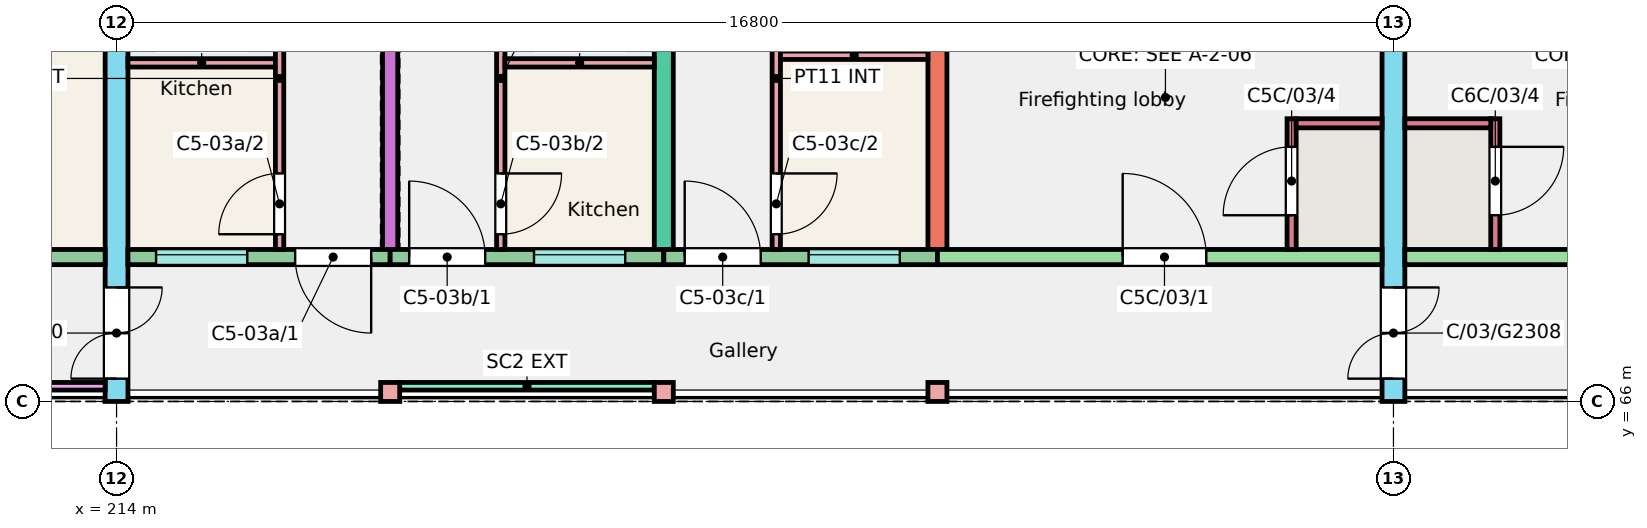
"""IFC4 building model, lengths in metres.
Left out: names, types, materials, properties, quantities, classifications, styles, units other than length and angle.
Written with IfcOpenShell. Run it as: python <this file> out.ifc"""

import sys

from ifc_helpers import new_model, si_unit, direction, frame, frame_2d, origin, origin_2d, place, context, subcontext, project, spatial, rectangle, extrude, element, fill, save


model = new_model("IFC4")
c1 = context("Model", 3, precision=1e-05, world=origin(), true_north=direction((0.0, 1.0)))
c2 = subcontext(c1, "Body", "Model", "MODEL_VIEW")
j1 = project(units=[si_unit("LENGTHUNIT", "METRE"), si_unit("PLANEANGLEUNIT", "RADIAN")], contexts=[c1])
p1 = place(None, origin())
s1 = spatial("IfcSite", under=j1, at=p1, CompositionType="ELEMENT")
p2 = place(p1, origin())
s2 = spatial("IfcBuilding", under=s1, at=p2, CompositionType="ELEMENT")
p3 = place(p2, frame((0.0, 0.0, 9.0)))
s3 = spatial("IfcBuildingStorey", under=s2, at=p3, CompositionType="ELEMENT", Elevation=9.0)
p4 = place(p3, frame((214.0, 66.0, 0.0), z_axis=(0.0, 0.0, 1.0), x_axis=(0.0, 1.0, 0.0)))
e1 = element("IfcWall", 1, at=p4, inside=s3, PredefinedType="SHEAR", context=c2, shape_type="SweptSolid", body=[
    extrude(rectangle(XDim=11.0, YDim=0.3, at=frame_2d((5.5, 0.0))), origin(), (0.0, 0.0, 1.0), 3.0),
])
p5 = place(p4, frame((0.3, 0.0, 0.0)))
e2 = element("IfcOpeningElement", 2, at=p5, cuts=e1, PredefinedType="OPENING", context=c2, shape_type="SweptSolid", body=[
    extrude(rectangle(XDim=1.2, YDim=2.1, at=frame_2d((0.6, 1.05))), frame((0.0, 0.16, 0.0), z_axis=(0.0, -1.0, 0.0), x_axis=(1.0, 0.0, 0.0)), (0.0, 0.0, 1.0), 0.32),
])
p6 = place(p3, frame((217.6, 68.0, 0.0), z_axis=(0.0, 0.0, 1.0), x_axis=(0.0, 1.0, 0.0)))
e3 = element("IfcWall", 3, at=p6, inside=s3, PredefinedType="SHEAR", context=c2, shape_type="SweptSolid", body=[
    extrude(rectangle(XDim=9.0, YDim=0.2, at=frame_2d((4.5, 0.0))), origin(), (0.0, 0.0, 1.0), 3.0),
])
for number, where, z_axis, x_axis in (
    (4, (221.2, 68.0, 0.0), (0.0, 0.0, 1.0), (0.0, 1.0, 0.0)),
    (5, (224.8, 68.0, 0.0), (0.0, 0.0, 1.0), (0.0, 1.0, 0.0)),
):
    element("IfcWall", number, at=place(p3, frame(where, z_axis=z_axis, x_axis=x_axis)), inside=s3, PredefinedType="SHEAR", context=c2, shape_type="SweptSolid", body=[
        extrude(rectangle(XDim=9.0, YDim=0.25, at=frame_2d((4.5, 0.0))), origin(), (0.0, 0.0, 1.0), 3.0),
    ])
p7 = place(p3, frame((230.8, 66.0, 0.0), z_axis=(0.0, 0.0, 1.0), x_axis=(0.0, 1.0, 0.0)))
e6 = element("IfcWall", 6, at=p7, inside=s3, PredefinedType="SHEAR", context=c2, shape_type="SweptSolid", body=[
    extrude(rectangle(XDim=11.0, YDim=0.3, at=frame_2d((5.5, 0.0))), origin(), (0.0, 0.0, 1.0), 3.0),
])
p8 = place(p7, frame((0.3, 0.0, 0.0)))
e7 = element("IfcOpeningElement", 7, at=p8, cuts=e6, PredefinedType="OPENING", context=c2, shape_type="SweptSolid", body=[
    extrude(rectangle(XDim=1.2, YDim=2.1, at=frame_2d((0.6, 1.05))), frame((0.0, 0.16, 0.0), z_axis=(0.0, -1.0, 0.0), x_axis=(1.0, 0.0, 0.0)), (0.0, 0.0, 1.0), 0.32),
])
p9 = place(p3, frame((210.4, 67.9, 0.0), z_axis=(0.0, 0.0, 1.0), x_axis=(1.0, 0.0, 0.0)))
e8 = element("IfcWall", 8, at=p9, inside=s3, PredefinedType="SOLIDWALL", context=c2, shape_type="SweptSolid", body=[
    extrude(rectangle(XDim=3.45, YDim=0.2, at=frame_2d((1.725, 0.0))), origin(), (0.0, 0.0, 1.0), 3.0),
])
p10 = place(p9, frame((1.025, 0.0, 0.9)))
e9 = element("IfcOpeningElement", 9, at=p10, cuts=e8, PredefinedType="OPENING", context=c2, shape_type="SweptSolid", body=[
    extrude(rectangle(XDim=1.5, YDim=1.5, at=frame_2d((0.75, 0.75))), frame((0.0, 0.11, 0.0), z_axis=(0.0, -1.0, 0.0), x_axis=(1.0, 0.0, 0.0)), (0.0, 0.0, 1.0), 0.22),
])
p11 = place(p3, frame((214.15, 67.9, 0.0), z_axis=(0.0, 0.0, 1.0), x_axis=(1.0, 0.0, 0.0)))
e10 = element("IfcWall", 10, at=p11, inside=s3, PredefinedType="SOLIDWALL", context=c2, shape_type="SweptSolid", body=[
    extrude(rectangle(XDim=3.45, YDim=0.2, at=frame_2d((1.725, 0.0))), origin(), (0.0, 0.0, 1.0), 3.0),
])
p12 = place(p11, frame((0.37, 0.0, 1.1)))
e11 = element("IfcOpeningElement", 11, at=p12, cuts=e10, PredefinedType="OPENING", context=c2, shape_type="SweptSolid", body=[
    extrude(rectangle(XDim=1.2, YDim=1.3, at=frame_2d((0.6, 0.65))), frame((0.0, 0.11, 0.0), z_axis=(0.0, -1.0, 0.0), x_axis=(1.0, 0.0, 0.0)), (0.0, 0.0, 1.0), 0.22),
])
p13 = place(p11, frame((2.2, 0.0, 0.0)))
e12 = element("IfcOpeningElement", 12, at=p13, cuts=e10, PredefinedType="OPENING", context=c2, shape_type="SweptSolid", body=[
    extrude(rectangle(XDim=1.0, YDim=2.1, at=frame_2d((0.5, 1.05))), frame((0.0, 0.11, 0.0), z_axis=(0.0, -1.0, 0.0), x_axis=(1.0, 0.0, 0.0)), (0.0, 0.0, 1.0), 0.22),
])
p14 = place(p3, frame((217.6, 67.9, 0.0), z_axis=(0.0, 0.0, 1.0), x_axis=(1.0, 0.0, 0.0)))
e13 = element("IfcWall", 13, at=p14, inside=s3, PredefinedType="SOLIDWALL", context=c2, shape_type="SweptSolid", body=[
    extrude(rectangle(XDim=3.6, YDim=0.2, at=frame_2d((1.8, 0.0))), origin(), (0.0, 0.0, 1.0), 3.0),
])
p15 = place(p14, frame((1.893, 0.0, 1.1)))
e14 = element("IfcOpeningElement", 14, at=p15, cuts=e13, PredefinedType="OPENING", context=c2, shape_type="SweptSolid", body=[
    extrude(rectangle(XDim=1.2, YDim=1.3, at=frame_2d((0.6, 0.65))), frame((0.0, 0.11, 0.0), z_axis=(0.0, -1.0, 0.0), x_axis=(1.0, 0.0, 0.0)), (0.0, 0.0, 1.0), 0.22),
])
p16 = place(p14, frame((0.25, 0.0, 0.0)))
e15 = element("IfcOpeningElement", 15, at=p16, cuts=e13, PredefinedType="OPENING", context=c2, shape_type="SweptSolid", body=[
    extrude(rectangle(XDim=1.0, YDim=2.1, at=frame_2d((0.5, 1.05))), frame((0.0, 0.11, 0.0), z_axis=(0.0, -1.0, 0.0), x_axis=(1.0, 0.0, 0.0)), (0.0, 0.0, 1.0), 0.22),
])
p17 = place(p3, frame((221.2, 67.9, 0.0), z_axis=(0.0, 0.0, 1.0), x_axis=(1.0, 0.0, 0.0)))
e16 = element("IfcWall", 16, at=p17, inside=s3, PredefinedType="SOLIDWALL", context=c2, shape_type="SweptSolid", body=[
    extrude(rectangle(XDim=3.6, YDim=0.2, at=frame_2d((1.8, 0.0))), origin(), (0.0, 0.0, 1.0), 3.0),
])
p18 = place(p17, frame((1.905, 0.0, 1.1)))
e17 = element("IfcOpeningElement", 17, at=p18, cuts=e16, PredefinedType="OPENING", context=c2, shape_type="SweptSolid", body=[
    extrude(rectangle(XDim=1.2, YDim=1.3, at=frame_2d((0.6, 0.65))), frame((0.0, 0.11, 0.0), z_axis=(0.0, -1.0, 0.0), x_axis=(1.0, 0.0, 0.0)), (0.0, 0.0, 1.0), 0.22),
])
p19 = place(p17, frame((0.275, 0.0, 0.0)))
e18 = element("IfcOpeningElement", 18, at=p19, cuts=e16, PredefinedType="OPENING", context=c2, shape_type="SweptSolid", body=[
    extrude(rectangle(XDim=1.0, YDim=2.1, at=frame_2d((0.5, 1.05))), frame((0.0, 0.11, 0.0), z_axis=(0.0, -1.0, 0.0), x_axis=(1.0, 0.0, 0.0)), (0.0, 0.0, 1.0), 0.22),
])
p20 = place(p3, frame((224.8, 67.9, 0.0), z_axis=(0.0, 0.0, 1.0), x_axis=(1.0, 0.0, 0.0)))
e19 = element("IfcWall", 19, at=p20, inside=s3, PredefinedType="SHEAR", context=c2, shape_type="SweptSolid", body=[
    extrude(rectangle(XDim=5.85, YDim=0.2, at=frame_2d((2.925, 0.0))), origin(), (0.0, 0.0, 1.0), 3.0),
])
p21 = place(p20, frame((2.438, 0.0, 0.0)))
e20 = element("IfcOpeningElement", 20, at=p21, cuts=e19, PredefinedType="OPENING", context=c2, shape_type="SweptSolid", body=[
    extrude(rectangle(XDim=1.1, YDim=2.1, at=frame_2d((0.55, 1.05))), frame((0.0, 0.11, 0.0), z_axis=(0.0, -1.0, 0.0), x_axis=(1.0, 0.0, 0.0)), (0.0, 0.0, 1.0), 0.22),
])
p22 = place(p3, frame((229.46, 68.0, 0.0), z_axis=(0.0, 0.0, 1.0), x_axis=(0.0, 1.0, 0.0)))
e21 = element("IfcWall", 21, at=p22, inside=s3, PredefinedType="SHEAR", context=c2, shape_type="SweptSolid", body=[
    extrude(rectangle(XDim=1.72, YDim=0.12, at=frame_2d((0.86, 0.0))), origin(), (0.0, 0.0, 1.0), 3.0),
])
p23 = place(p22, frame((0.45, 0.0, 0.0)))
e22 = element("IfcOpeningElement", 22, at=p23, cuts=e21, PredefinedType="OPENING", context=c2, shape_type="SweptSolid", body=[
    extrude(rectangle(XDim=0.9, YDim=2.1, at=frame_2d((0.45, 1.05))), frame((0.0, 0.07, 0.0), z_axis=(0.0, -1.0, 0.0), x_axis=(1.0, 0.0, 0.0)), (0.0, 0.0, 1.0), 0.14),
])
p24 = place(p3, frame((229.52, 69.66, 0.0), z_axis=(0.0, 0.0, 1.0), x_axis=(1.0, 0.0, 0.0)))
e23 = element("IfcWall", 23, at=p24, inside=s3, PredefinedType="SHEAR", context=c2, shape_type="SweptSolid", body=[
    extrude(rectangle(XDim=1.13, YDim=0.12, at=frame_2d((0.565, 0.0))), origin(), (0.0, 0.0, 1.0), 3.0),
])
p25 = place(p3, frame((230.95, 67.9, 0.0), z_axis=(0.0, 0.0, 1.0), x_axis=(1.0, 0.0, 0.0)))
e24 = element("IfcWall", 24, at=p25, inside=s3, PredefinedType="SHEAR", context=c2, shape_type="SweptSolid", body=[
    extrude(rectangle(XDim=5.85, YDim=0.2, at=frame_2d((2.925, 0.0))), origin(), (0.0, 0.0, 1.0), 3.0),
])
p26 = place(p25, frame((2.312, 0.0, 0.0)))
e25 = element("IfcOpeningElement", 25, at=p26, cuts=e24, PredefinedType="OPENING", context=c2, shape_type="SweptSolid", body=[
    extrude(rectangle(XDim=1.1, YDim=2.1, at=frame_2d((0.55, 1.05))), frame((0.0, 0.11, 0.0), z_axis=(0.0, -1.0, 0.0), x_axis=(1.0, 0.0, 0.0)), (0.0, 0.0, 1.0), 0.22),
])
p27 = place(p3, frame((232.14, 68.0, 0.0), z_axis=(0.0, 0.0, 1.0), x_axis=(0.0, 1.0, 0.0)))
e26 = element("IfcWall", 26, at=p27, inside=s3, PredefinedType="SHEAR", context=c2, shape_type="SweptSolid", body=[
    extrude(rectangle(XDim=1.72, YDim=0.12, at=frame_2d((0.86, 0.0))), origin(), (0.0, 0.0, 1.0), 3.0),
])
p28 = place(p27, frame((0.45, 0.0, 0.0)))
e27 = element("IfcOpeningElement", 27, at=p28, cuts=e26, PredefinedType="OPENING", context=c2, shape_type="SweptSolid", body=[
    extrude(rectangle(XDim=0.9, YDim=2.1, at=frame_2d((0.45, 1.05))), frame((0.0, 0.07, 0.0), z_axis=(0.0, -1.0, 0.0), x_axis=(1.0, 0.0, 0.0)), (0.0, 0.0, 1.0), 0.14),
])
p29 = place(p3, frame((230.95, 69.66, 0.0), z_axis=(0.0, 0.0, 1.0), x_axis=(1.0, 0.0, 0.0)))
e28 = element("IfcWall", 28, at=p29, inside=s3, PredefinedType="SHEAR", context=c2, shape_type="SweptSolid", body=[
    extrude(rectangle(XDim=1.13, YDim=0.12, at=frame_2d((0.565, 0.0))), origin(), (0.0, 0.0, 1.0), 3.0),
])
for number, where, z_axis, x_axis in (
    (29, (217.6, 66.125, 0.0), (0.0, 0.0, 1.0), (1.0, 0.0, 0.0)),
    (30, (221.2, 66.125, 0.0), (0.0, 0.0, 1.0), (1.0, 0.0, 0.0)),
    (31, (224.8, 66.125, 0.0), (0.0, 0.0, 1.0), (1.0, 0.0, 0.0)),
):
    element("IfcColumn", number, at=place(p3, frame(where, z_axis=z_axis, x_axis=x_axis)), inside=s3, PredefinedType="COLUMN", context=c2, shape_type="SweptSolid", body=[
        extrude(rectangle(XDim=0.25, YDim=0.25, at=origin_2d()), origin(), (0.0, 0.0, 1.0), 3.0),
    ])
p30 = place(p3, frame((210.525, 66.2, 0.0), z_axis=(0.0, 0.0, 1.0), x_axis=(1.0, 0.0, 0.0)))
e32 = element("IfcWall", 32, at=p30, inside=s3, PredefinedType="SOLIDWALL", context=c2, shape_type="SweptSolid", body=[
    extrude(rectangle(XDim=3.325, YDim=0.1, at=frame_2d((1.663, 0.0))), origin(), (0.0, 0.0, 1.0), 2.45),
])
p31 = place(p3, frame((217.725, 66.2, 0.0), z_axis=(0.0, 0.0, 1.0), x_axis=(1.0, 0.0, 0.0)))
e33 = element("IfcWall", 33, at=p31, inside=s3, PredefinedType="SOLIDWALL", context=c2, shape_type="SweptSolid", body=[
    extrude(rectangle(XDim=3.35, YDim=0.1, at=frame_2d((1.675, 0.0))), origin(), (0.0, 0.0, 1.0), 2.45),
])
p32 = place(p3, frame((214.15, 70.455, 0.0), z_axis=(0.0, 0.0, 1.0), x_axis=(1.0, 0.0, 0.0)))
e34 = element("IfcWall", 34, at=p32, inside=s3, PredefinedType="PARTITIONING", context=c2, shape_type="SweptSolid", body=[
    extrude(rectangle(XDim=1.94, YDim=0.11, at=frame_2d((0.97, 0.0))), origin(), (0.0, 0.0, 1.0), 2.8),
])
p33 = place(p3, frame((216.145, 68.0, 0.0), z_axis=(0.0, 0.0, 1.0), x_axis=(0.0, 1.0, 0.0)))
e35 = element("IfcWall", 35, at=p33, inside=s3, PredefinedType="PARTITIONING", context=c2, shape_type="SweptSolid", body=[
    extrude(rectangle(XDim=4.5, YDim=0.11, at=frame_2d((2.25, 0.0))), origin(), (0.0, 0.0, 1.0), 2.8),
])
p34 = place(p33, frame((0.2, 0.0, 0.0)))
e36 = element("IfcOpeningElement", 36, at=p34, cuts=e35, PredefinedType="OPENING", context=c2, shape_type="SweptSolid", body=[
    extrude(rectangle(XDim=0.8, YDim=2.1, at=frame_2d((0.4, 1.05))), frame((0.0, 0.065, 0.0), z_axis=(0.0, -1.0, 0.0), x_axis=(1.0, 0.0, 0.0)), (0.0, 0.0, 1.0), 0.13),
])
p35 = place(p33, frame((3.55, 0.0, 0.0)))
e37 = element("IfcOpeningElement", 37, at=p35, cuts=e35, PredefinedType="OPENING", context=c2, shape_type="SweptSolid", body=[
    extrude(rectangle(XDim=0.8, YDim=2.1, at=frame_2d((0.4, 1.05))), frame((0.0, 0.065, 0.0), z_axis=(0.0, -1.0, 0.0), x_axis=(1.0, 0.0, 0.0)), (0.0, 0.0, 1.0), 0.13),
])
p36 = place(p3, frame((219.055, 68.0, 0.0), z_axis=(0.0, 0.0, 1.0), x_axis=(0.0, 1.0, 0.0)))
e38 = element("IfcWall", 38, at=p36, inside=s3, PredefinedType="PARTITIONING", context=c2, shape_type="SweptSolid", body=[
    extrude(rectangle(XDim=4.5, YDim=0.11, at=frame_2d((2.25, 0.0))), origin(), (0.0, 0.0, 1.0), 2.8),
])
p37 = place(p36, frame((0.2, 0.0, 0.0)))
e39 = element("IfcOpeningElement", 39, at=p37, cuts=e38, PredefinedType="OPENING", context=c2, shape_type="SweptSolid", body=[
    extrude(rectangle(XDim=0.8, YDim=2.1, at=frame_2d((0.4, 1.05))), frame((0.0, 0.065, 0.0), z_axis=(0.0, -1.0, 0.0), x_axis=(1.0, 0.0, 0.0)), (0.0, 0.0, 1.0), 0.13),
])
p38 = place(p36, frame((3.55, 0.0, 0.0)))
e40 = element("IfcOpeningElement", 40, at=p38, cuts=e38, PredefinedType="OPENING", context=c2, shape_type="SweptSolid", body=[
    extrude(rectangle(XDim=0.8, YDim=2.1, at=frame_2d((0.4, 1.05))), frame((0.0, 0.065, 0.0), z_axis=(0.0, -1.0, 0.0), x_axis=(1.0, 0.0, 0.0)), (0.0, 0.0, 1.0), 0.13),
])
p39 = place(p3, frame((219.11, 70.455, 0.0), z_axis=(0.0, 0.0, 1.0), x_axis=(1.0, 0.0, 0.0)))
e41 = element("IfcWall", 41, at=p39, inside=s3, PredefinedType="PARTITIONING", context=c2, shape_type="SweptSolid", body=[
    extrude(rectangle(XDim=1.965, YDim=0.11, at=frame_2d((0.982, 0.0))), origin(), (0.0, 0.0, 1.0), 2.8),
])
p40 = place(p3, frame((222.68, 68.0, 0.0), z_axis=(0.0, 0.0, 1.0), x_axis=(0.0, 1.0, 0.0)))
e42 = element("IfcWall", 42, at=p40, inside=s3, PredefinedType="PARTITIONING", context=c2, shape_type="SweptSolid", body=[
    extrude(rectangle(XDim=4.5, YDim=0.11, at=frame_2d((2.25, 0.0))), origin(), (0.0, 0.0, 1.0), 2.8),
])
p41 = place(p40, frame((0.2, 0.0, 0.0)))
e43 = element("IfcOpeningElement", 43, at=p41, cuts=e42, PredefinedType="OPENING", context=c2, shape_type="SweptSolid", body=[
    extrude(rectangle(XDim=0.8, YDim=2.1, at=frame_2d((0.4, 1.05))), frame((0.0, 0.065, 0.0), z_axis=(0.0, -1.0, 0.0), x_axis=(1.0, 0.0, 0.0)), (0.0, 0.0, 1.0), 0.13),
])
p42 = place(p40, frame((3.55, 0.0, 0.0)))
e44 = element("IfcOpeningElement", 44, at=p42, cuts=e42, PredefinedType="OPENING", context=c2, shape_type="SweptSolid", body=[
    extrude(rectangle(XDim=0.8, YDim=2.1, at=frame_2d((0.4, 1.05))), frame((0.0, 0.065, 0.0), z_axis=(0.0, -1.0, 0.0), x_axis=(1.0, 0.0, 0.0)), (0.0, 0.0, 1.0), 0.13),
])
p43 = place(p3, frame((222.735, 70.555, 0.0), z_axis=(0.0, 0.0, 1.0), x_axis=(1.0, 0.0, 0.0)))
e45 = element("IfcWall", 45, at=p43, inside=s3, PredefinedType="PARTITIONING", context=c2, shape_type="SweptSolid", body=[
    extrude(rectangle(XDim=1.94, YDim=0.11, at=frame_2d((0.97, 0.0))), origin(), (0.0, 0.0, 1.0), 2.8),
])
p44 = place(p12, origin())
e46 = element("IfcWindow", 46, at=p44, inside=s3, PartitioningType="SINGLE_PANEL", PredefinedType="WINDOW", context=c2, shape_type="SweptSolid", body=[
    extrude(rectangle(XDim=1.2, YDim=1.3, at=frame_2d((0.6, 0.65))), frame((0.0, 0.06, 0.0), z_axis=(0.0, -1.0, 0.0), x_axis=(1.0, 0.0, 0.0)), (0.0, 0.0, 1.0), 0.06),
])
fill(e11, e46)
p45 = place(p15, origin())
e47 = element("IfcWindow", 47, at=p45, inside=s3, PartitioningType="SINGLE_PANEL", PredefinedType="WINDOW", context=c2, shape_type="SweptSolid", body=[
    extrude(rectangle(XDim=1.2, YDim=1.3, at=frame_2d((0.6, 0.65))), frame((0.0, 0.06, 0.0), z_axis=(0.0, -1.0, 0.0), x_axis=(1.0, 0.0, 0.0)), (0.0, 0.0, 1.0), 0.06),
])
fill(e14, e47)
p46 = place(p18, origin())
e48 = element("IfcWindow", 48, at=p46, inside=s3, PartitioningType="SINGLE_PANEL", PredefinedType="WINDOW", context=c2, shape_type="SweptSolid", body=[
    extrude(rectangle(XDim=1.2, YDim=1.3, at=frame_2d((0.6, 0.65))), frame((0.0, 0.06, 0.0), z_axis=(0.0, -1.0, 0.0), x_axis=(1.0, 0.0, 0.0)), (0.0, 0.0, 1.0), 0.06),
])
fill(e17, e48)
p47 = place(p13, origin())
e49 = element("IfcDoor", 49, at=p47, inside=s3, OperationType="SINGLE_SWING_RIGHT", PredefinedType="DOOR", context=c2, shape_type="SweptSolid", body=[
    extrude(rectangle(XDim=1.0, YDim=2.1, at=frame_2d((0.5, 1.05))), frame((0.0, 0.025, 0.0), z_axis=(0.0, -1.0, 0.0), x_axis=(1.0, 0.0, 0.0)), (0.0, 0.0, 1.0), 0.05),
])
fill(e12, e49)
p48 = place(p34, origin())
e50 = element("IfcDoor", 50, at=p48, inside=s3, OperationType="SINGLE_SWING_LEFT", PredefinedType="DOOR", context=c2, shape_type="SweptSolid", body=[
    extrude(rectangle(XDim=0.8, YDim=2.1, at=frame_2d((0.4, 1.05))), frame((0.0, 0.025, 0.0), z_axis=(0.0, -1.0, 0.0), x_axis=(1.0, 0.0, 0.0)), (0.0, 0.0, 1.0), 0.05),
])
fill(e36, e50)
p49 = place(p16, origin())
e51 = element("IfcDoor", 51, at=p49, inside=s3, OperationType="SINGLE_SWING_LEFT", PredefinedType="DOOR", context=c2, shape_type="SweptSolid", body=[
    extrude(rectangle(XDim=1.0, YDim=2.1, at=frame_2d((0.5, 1.05))), frame((0.0, 0.025, 0.0), z_axis=(0.0, -1.0, 0.0), x_axis=(1.0, 0.0, 0.0)), (0.0, 0.0, 1.0), 0.05),
])
fill(e15, e51)
p50 = place(p37, origin())
e52 = element("IfcDoor", 52, at=p50, inside=s3, OperationType="SINGLE_SWING_RIGHT", PredefinedType="DOOR", context=c2, shape_type="SweptSolid", body=[
    extrude(rectangle(XDim=0.8, YDim=2.1, at=frame_2d((0.4, 1.05))), frame((0.0, 0.025, 0.0), z_axis=(0.0, -1.0, 0.0), x_axis=(1.0, 0.0, 0.0)), (0.0, 0.0, 1.0), 0.05),
])
fill(e39, e52)
p51 = place(p19, origin())
e53 = element("IfcDoor", 53, at=p51, inside=s3, OperationType="SINGLE_SWING_LEFT", PredefinedType="DOOR", context=c2, shape_type="SweptSolid", body=[
    extrude(rectangle(XDim=1.0, YDim=2.1, at=frame_2d((0.5, 1.05))), frame((0.0, 0.025, 0.0), z_axis=(0.0, -1.0, 0.0), x_axis=(1.0, 0.0, 0.0)), (0.0, 0.0, 1.0), 0.05),
])
fill(e18, e53)
p52 = place(p41, origin())
e54 = element("IfcDoor", 54, at=p52, inside=s3, OperationType="SINGLE_SWING_RIGHT", PredefinedType="DOOR", context=c2, shape_type="SweptSolid", body=[
    extrude(rectangle(XDim=0.8, YDim=2.1, at=frame_2d((0.4, 1.05))), frame((0.0, 0.025, 0.0), z_axis=(0.0, -1.0, 0.0), x_axis=(1.0, 0.0, 0.0)), (0.0, 0.0, 1.0), 0.05),
])
fill(e43, e54)
p53 = place(p21, origin())
e55 = element("IfcDoor", 55, at=p53, inside=s3, OperationType="SINGLE_SWING_LEFT", PredefinedType="DOOR", context=c2, shape_type="SweptSolid", body=[
    extrude(rectangle(XDim=1.1, YDim=2.1, at=frame_2d((0.55, 1.05))), frame((0.0, 0.025, 0.0), z_axis=(0.0, -1.0, 0.0), x_axis=(1.0, 0.0, 0.0)), (0.0, 0.0, 1.0), 0.05),
])
fill(e20, e55)
p54 = place(p23, origin())
e56 = element("IfcDoor", 56, at=p54, inside=s3, OperationType="SINGLE_SWING_LEFT", PredefinedType="DOOR", context=c2, shape_type="SweptSolid", body=[
    extrude(rectangle(XDim=0.9, YDim=2.1, at=frame_2d((0.45, 1.05))), frame((0.0, 0.025, 0.0), z_axis=(0.0, -1.0, 0.0), x_axis=(1.0, 0.0, 0.0)), (0.0, 0.0, 1.0), 0.05),
])
fill(e22, e56)
p55 = place(p28, origin())
e57 = element("IfcDoor", 57, at=p55, inside=s3, OperationType="SINGLE_SWING_RIGHT", PredefinedType="DOOR", context=c2, shape_type="SweptSolid", body=[
    extrude(rectangle(XDim=0.9, YDim=2.1, at=frame_2d((0.45, 1.05))), frame((0.0, 0.025, 0.0), z_axis=(0.0, -1.0, 0.0), x_axis=(1.0, 0.0, 0.0)), (0.0, 0.0, 1.0), 0.05),
])
fill(e27, e57)
p56 = place(p5, origin())
e58 = element("IfcDoor", 58, at=p56, inside=s3, OperationType="DOUBLE_DOOR_SINGLE_SWING", PredefinedType="DOOR", context=c2, shape_type="SweptSolid", body=[
    extrude(rectangle(XDim=1.2, YDim=2.1, at=frame_2d((0.6, 1.05))), frame((0.0, 0.025, 0.0), z_axis=(0.0, -1.0, 0.0), x_axis=(1.0, 0.0, 0.0)), (0.0, 0.0, 1.0), 0.05),
])
fill(e2, e58)
p57 = place(p8, origin())
e59 = element("IfcDoor", 59, at=p57, inside=s3, OperationType="DOUBLE_DOOR_SINGLE_SWING", PredefinedType="DOOR", context=c2, shape_type="SweptSolid", body=[
    extrude(rectangle(XDim=1.2, YDim=2.1, at=frame_2d((0.6, 1.05))), frame((0.0, 0.025, 0.0), z_axis=(0.0, -1.0, 0.0), x_axis=(1.0, 0.0, 0.0)), (0.0, 0.0, 1.0), 0.05),
])
fill(e7, e59)
save(model, sys.argv[1])
